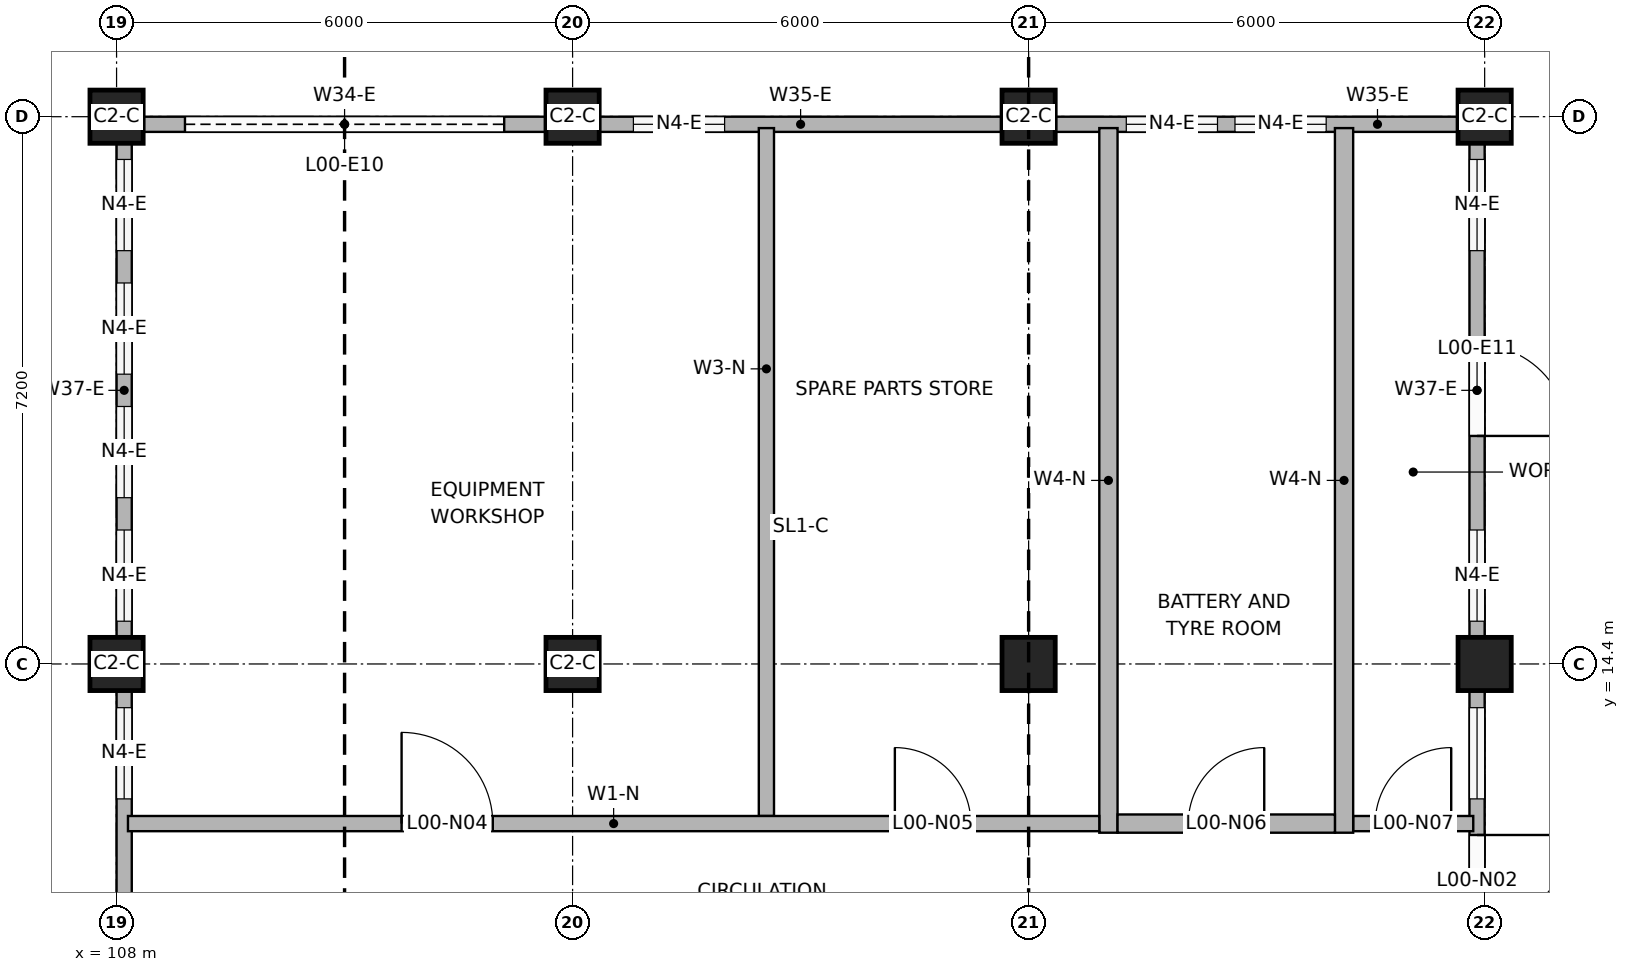
"""IFC4 building model, lengths in metres.
Left out: names, types, materials, properties, quantities, classifications, styles, units other than length and angle.
Written with IfcOpenShell. Run it as: python <this file> out.ifc"""

import sys

from ifc_helpers import new_model, si_unit, direction, frame, frame_2d, origin, origin_2d, place, context, subcontext, project, spatial, rectangle, extrude, element, fill, save


model = new_model("IFC4")
c1 = context("Model", 3, precision=1e-05, world=origin(), true_north=direction((0.0, 1.0)))
c2 = subcontext(c1, "Body", "Model", "MODEL_VIEW")
j1 = project(units=[si_unit("LENGTHUNIT", "METRE"), si_unit("PLANEANGLEUNIT", "RADIAN")], contexts=[c1])
p1 = place(None, origin())
s1 = spatial("IfcSite", under=j1, at=p1, CompositionType="ELEMENT")
p2 = place(p1, origin())
s2 = spatial("IfcBuilding", under=s1, at=p2, CompositionType="ELEMENT")
p3 = place(p2, origin())
s3 = spatial("IfcBuildingStorey", under=s2, at=p3, CompositionType="ELEMENT", Elevation=0.0)
for number, where, z_axis, x_axis in (
    (1, (108.0, 14.4, 0.0), (0.0, 0.0, 1.0), (1.0, 0.0, 0.0)),
    (2, (114.0, 14.4, 0.0), (0.0, 0.0, 1.0), (1.0, 0.0, 0.0)),
    (3, (120.0, 14.4, 0.0), (0.0, 0.0, 1.0), (1.0, 0.0, 0.0)),
    (4, (126.0, 14.4, 0.0), (0.0, 0.0, 1.0), (1.0, 0.0, 0.0)),
    (5, (108.0, 21.6, 0.0), (0.0, 0.0, 1.0), (1.0, 0.0, 0.0)),
    (6, (114.0, 21.6, 0.0), (0.0, 0.0, 1.0), (1.0, 0.0, 0.0)),
    (7, (120.0, 21.6, 0.0), (0.0, 0.0, 1.0), (1.0, 0.0, 0.0)),
    (8, (126.0, 21.6, 0.0), (0.0, 0.0, 1.0), (1.0, 0.0, 0.0)),
):
    element("IfcColumn", number, at=place(p3, frame(where, z_axis=z_axis, x_axis=x_axis)), inside=s3, PredefinedType="COLUMN", context=c2, shape_type="SweptSolid", body=[
        extrude(rectangle(XDim=0.7, YDim=0.7, at=origin_2d()), origin(), (0.0, 0.0, 1.0), 4.0),
    ])
p4 = place(p3, frame((108.35, 21.5, 0.0), z_axis=(0.0, 0.0, 1.0), x_axis=(1.0, 0.0, 0.0)))
e9 = element("IfcWall", 9, at=p4, inside=s3, PredefinedType="SOLIDWALL", context=c2, shape_type="SweptSolid", body=[
    extrude(rectangle(XDim=5.3, YDim=0.2, at=frame_2d((2.65, 0.0))), origin(), (0.0, 0.0, 1.0), 3.6),
])
p5 = place(p4, frame((0.55, 0.0, 0.0)))
e10 = element("IfcOpeningElement", 10, at=p5, cuts=e9, PredefinedType="OPENING", context=c2, shape_type="SweptSolid", body=[
    extrude(rectangle(XDim=4.2, YDim=3.5, at=frame_2d((2.1, 1.75))), frame((0.0, 0.11, 0.0), z_axis=(0.0, -1.0, 0.0), x_axis=(1.0, 0.0, 0.0)), (0.0, 0.0, 1.0), 0.22),
])
p6 = place(p3, frame((114.35, 21.5, 0.0), z_axis=(0.0, 0.0, 1.0), x_axis=(1.0, 0.0, 0.0)))
e11 = element("IfcWall", 11, at=p6, inside=s3, PredefinedType="SOLIDWALL", context=c2, shape_type="SweptSolid", body=[
    extrude(rectangle(XDim=5.3, YDim=0.2, at=frame_2d((2.65, 0.0))), origin(), (0.0, 0.0, 1.0), 3.2),
])
p7 = place(p6, frame((0.45, 0.0, 1.2)))
e12 = element("IfcOpeningElement", 12, at=p7, cuts=e11, PredefinedType="OPENING", context=c2, shape_type="SweptSolid", body=[
    extrude(rectangle(XDim=1.2, YDim=1.4, at=frame_2d((0.6, 0.7))), frame((0.0, 0.11, 0.0), z_axis=(0.0, -1.0, 0.0), x_axis=(1.0, 0.0, 0.0)), (0.0, 0.0, 1.0), 0.22),
])
p8 = place(p3, frame((120.35, 21.5, 0.0), z_axis=(0.0, 0.0, 1.0), x_axis=(1.0, 0.0, 0.0)))
e13 = element("IfcWall", 13, at=p8, inside=s3, PredefinedType="SOLIDWALL", context=c2, shape_type="SweptSolid", body=[
    extrude(rectangle(XDim=5.3, YDim=0.2, at=frame_2d((2.65, 0.0))), origin(), (0.0, 0.0, 1.0), 3.2),
])
p9 = place(p8, frame((0.935, 0.0, 1.2)))
e14 = element("IfcOpeningElement", 14, at=p9, cuts=e13, PredefinedType="OPENING", context=c2, shape_type="SweptSolid", body=[
    extrude(rectangle(XDim=1.2, YDim=1.4, at=frame_2d((0.6, 0.7))), frame((0.0, 0.11, 0.0), z_axis=(0.0, -1.0, 0.0), x_axis=(1.0, 0.0, 0.0)), (0.0, 0.0, 1.0), 0.22),
])
p10 = place(p8, frame((2.365, 0.0, 1.2)))
e15 = element("IfcOpeningElement", 15, at=p10, cuts=e13, PredefinedType="OPENING", context=c2, shape_type="SweptSolid", body=[
    extrude(rectangle(XDim=1.2, YDim=1.4, at=frame_2d((0.6, 0.7))), frame((0.0, 0.11, 0.0), z_axis=(0.0, -1.0, 0.0), x_axis=(1.0, 0.0, 0.0)), (0.0, 0.0, 1.0), 0.22),
])
p11 = place(p3, frame((125.9, 7.55, 0.0), z_axis=(0.0, 0.0, 1.0), x_axis=(0.0, 1.0, 0.0)))
e16 = element("IfcWall", 16, at=p11, inside=s3, PredefinedType="SOLIDWALL", context=c2, shape_type="SweptSolid", body=[
    extrude(rectangle(XDim=6.5, YDim=0.2, at=frame_2d((3.25, 0.0))), origin(), (0.0, 0.0, 1.0), 3.1),
])
p12 = place(p11, frame((5.075, 0.0, 1.2)))
e17 = element("IfcOpeningElement", 17, at=p12, cuts=e16, PredefinedType="OPENING", context=c2, shape_type="SweptSolid", body=[
    extrude(rectangle(XDim=1.2, YDim=1.4, at=frame_2d((0.6, 0.7))), frame((0.0, 0.11, 0.0), z_axis=(0.0, -1.0, 0.0), x_axis=(1.0, 0.0, 0.0)), (0.0, 0.0, 1.0), 0.22),
])
p13 = place(p11, frame((3.4, 0.0, 0.0)))
e18 = element("IfcOpeningElement", 18, at=p13, cuts=e16, PredefinedType="OPENING", context=c2, shape_type="SweptSolid", body=[
    extrude(rectangle(XDim=1.2, YDim=2.1, at=frame_2d((0.6, 1.05))), frame((0.0, 0.11, 0.0), z_axis=(0.0, -1.0, 0.0), x_axis=(1.0, 0.0, 0.0)), (0.0, 0.0, 1.0), 0.22),
])
p14 = place(p3, frame((125.9, 14.75, 0.0), z_axis=(0.0, 0.0, 1.0), x_axis=(0.0, 1.0, 0.0)))
e19 = element("IfcWall", 19, at=p14, inside=s3, PredefinedType="SOLIDWALL", context=c2, shape_type="SweptSolid", body=[
    extrude(rectangle(XDim=6.5, YDim=0.2, at=frame_2d((3.25, 0.0))), origin(), (0.0, 0.0, 1.0), 3.1),
])
p15 = place(p14, frame((2.65, 0.0, 0.0)))
e20 = element("IfcOpeningElement", 20, at=p15, cuts=e19, PredefinedType="OPENING", context=c2, shape_type="SweptSolid", body=[
    extrude(rectangle(XDim=1.2, YDim=2.4, at=frame_2d((0.6, 1.2))), frame((0.0, 0.11, 0.0), z_axis=(0.0, -1.0, 0.0), x_axis=(1.0, 0.0, 0.0)), (0.0, 0.0, 1.0), 0.22),
])
p16 = place(p14, frame((0.212, 0.0, 1.2)))
e21 = element("IfcOpeningElement", 21, at=p16, cuts=e19, PredefinedType="OPENING", context=c2, shape_type="SweptSolid", body=[
    extrude(rectangle(XDim=1.2, YDim=1.4, at=frame_2d((0.6, 0.7))), frame((0.0, 0.11, 0.0), z_axis=(0.0, -1.0, 0.0), x_axis=(1.0, 0.0, 0.0)), (0.0, 0.0, 1.0), 0.22),
])
p17 = place(p14, frame((5.087, 0.0, 1.2)))
e22 = element("IfcOpeningElement", 22, at=p17, cuts=e19, PredefinedType="OPENING", context=c2, shape_type="SweptSolid", body=[
    extrude(rectangle(XDim=1.2, YDim=1.4, at=frame_2d((0.6, 0.7))), frame((0.0, 0.11, 0.0), z_axis=(0.0, -1.0, 0.0), x_axis=(1.0, 0.0, 0.0)), (0.0, 0.0, 1.0), 0.22),
])
p18 = place(p3, frame((108.1, 7.55, 0.0), z_axis=(0.0, 0.0, 1.0), x_axis=(0.0, 1.0, 0.0)))
e23 = element("IfcWall", 23, at=p18, inside=s3, PredefinedType="SOLIDWALL", context=c2, shape_type="SweptSolid", body=[
    extrude(rectangle(XDim=6.5, YDim=0.2, at=frame_2d((3.25, 0.0))), origin(), (0.0, 0.0, 1.0), 3.1),
])
p19 = place(p18, frame((5.075, 0.0, 1.2)))
e24 = element("IfcOpeningElement", 24, at=p19, cuts=e23, PredefinedType="OPENING", context=c2, shape_type="SweptSolid", body=[
    extrude(rectangle(XDim=1.2, YDim=1.4, at=frame_2d((0.6, 0.7))), frame((0.0, 0.11, 0.0), z_axis=(0.0, -1.0, 0.0), x_axis=(1.0, 0.0, 0.0)), (0.0, 0.0, 1.0), 0.22),
])
p20 = place(p3, frame((108.1, 14.75, 0.0), z_axis=(0.0, 0.0, 1.0), x_axis=(0.0, 1.0, 0.0)))
e25 = element("IfcWall", 25, at=p20, inside=s3, PredefinedType="SOLIDWALL", context=c2, shape_type="SweptSolid", body=[
    extrude(rectangle(XDim=6.5, YDim=0.2, at=frame_2d((3.25, 0.0))), origin(), (0.0, 0.0, 1.0), 3.1),
])
p21 = place(p20, frame((0.212, 0.0, 1.2)))
e26 = element("IfcOpeningElement", 26, at=p21, cuts=e25, PredefinedType="OPENING", context=c2, shape_type="SweptSolid", body=[
    extrude(rectangle(XDim=1.2, YDim=1.4, at=frame_2d((0.6, 0.7))), frame((0.0, 0.11, 0.0), z_axis=(0.0, -1.0, 0.0), x_axis=(1.0, 0.0, 0.0)), (0.0, 0.0, 1.0), 0.22),
])
p22 = place(p20, frame((1.837, 0.0, 1.2)))
e27 = element("IfcOpeningElement", 27, at=p22, cuts=e25, PredefinedType="OPENING", context=c2, shape_type="SweptSolid", body=[
    extrude(rectangle(XDim=1.2, YDim=1.4, at=frame_2d((0.6, 0.7))), frame((0.0, 0.11, 0.0), z_axis=(0.0, -1.0, 0.0), x_axis=(1.0, 0.0, 0.0)), (0.0, 0.0, 1.0), 0.22),
])
p23 = place(p20, frame((3.462, 0.0, 1.2)))
e28 = element("IfcOpeningElement", 28, at=p23, cuts=e25, PredefinedType="OPENING", context=c2, shape_type="SweptSolid", body=[
    extrude(rectangle(XDim=1.2, YDim=1.4, at=frame_2d((0.6, 0.7))), frame((0.0, 0.11, 0.0), z_axis=(0.0, -1.0, 0.0), x_axis=(1.0, 0.0, 0.0)), (0.0, 0.0, 1.0), 0.22),
])
p24 = place(p20, frame((5.087, 0.0, 1.2)))
e29 = element("IfcOpeningElement", 29, at=p24, cuts=e25, PredefinedType="OPENING", context=c2, shape_type="SweptSolid", body=[
    extrude(rectangle(XDim=1.2, YDim=1.4, at=frame_2d((0.6, 0.7))), frame((0.0, 0.11, 0.0), z_axis=(0.0, -1.0, 0.0), x_axis=(1.0, 0.0, 0.0)), (0.0, 0.0, 1.0), 0.22),
])
p25 = place(p3, frame((116.55, 12.4, 0.0), z_axis=(0.0, 0.0, 1.0), x_axis=(0.0, 1.0, 0.0)))
e30 = element("IfcWall", 30, at=p25, inside=s3, PredefinedType="PARTITIONING", context=c2, shape_type="SweptSolid", body=[
    extrude(rectangle(XDim=9.05, YDim=0.2, at=frame_2d((4.525, 0.0))), origin(), (0.0, 0.0, 1.0), 3.2),
])
for number, where, z_axis, x_axis in (
    (31, (121.05, 12.18, 0.0), (0.0, 0.0, 1.0), (0.0, 1.0, 0.0)),
    (32, (124.15, 12.18, 0.0), (0.0, 0.0, 1.0), (0.0, 1.0, 0.0)),
):
    element("IfcWall", number, at=place(p3, frame(where, z_axis=z_axis, x_axis=x_axis)), inside=s3, PredefinedType="PARTITIONING", context=c2, shape_type="SweptSolid", body=[
        extrude(rectangle(XDim=9.27, YDim=0.24, at=frame_2d((4.635, 0.0))), origin(), (0.0, 0.0, 1.0), 3.2),
    ])
p26 = place(p3, frame((108.15, 12.3, 0.0), z_axis=(0.0, 0.0, 1.0), x_axis=(1.0, 0.0, 0.0)))
e33 = element("IfcWall", 33, at=p26, inside=s3, PredefinedType="PARTITIONING", context=c2, shape_type="SweptSolid", body=[
    extrude(rectangle(XDim=12.78, YDim=0.2, at=frame_2d((6.39, 0.0))), origin(), (0.0, 0.0, 1.0), 3.1),
])
p27 = place(p26, frame((3.6, 0.0, 0.0)))
e34 = element("IfcOpeningElement", 34, at=p27, cuts=e33, PredefinedType="OPENING", context=c2, shape_type="SweptSolid", body=[
    extrude(rectangle(XDim=1.2, YDim=2.1, at=frame_2d((0.6, 1.05))), frame((0.0, 0.11, 0.0), z_axis=(0.0, -1.0, 0.0), x_axis=(1.0, 0.0, 0.0)), (0.0, 0.0, 1.0), 0.22),
])
p28 = place(p26, frame((10.09, 0.0, 0.0)))
e35 = element("IfcOpeningElement", 35, at=p28, cuts=e33, PredefinedType="OPENING", context=c2, shape_type="SweptSolid", body=[
    extrude(rectangle(XDim=1.0, YDim=2.1, at=frame_2d((0.5, 1.05))), frame((0.0, 0.11, 0.0), z_axis=(0.0, -1.0, 0.0), x_axis=(1.0, 0.0, 0.0)), (0.0, 0.0, 1.0), 0.22),
])
p29 = place(p3, frame((121.17, 12.3, 0.0), z_axis=(0.0, 0.0, 1.0), x_axis=(1.0, 0.0, 0.0)))
e36 = element("IfcWall", 36, at=p29, inside=s3, PredefinedType="PARTITIONING", context=c2, shape_type="SweptSolid", body=[
    extrude(rectangle(XDim=2.86, YDim=0.24, at=frame_2d((1.43, 0.0))), origin(), (0.0, 0.0, 1.0), 4.0),
])
p30 = place(p29, frame((0.93, 0.0, 0.0)))
e37 = element("IfcOpeningElement", 37, at=p30, cuts=e36, PredefinedType="OPENING", context=c2, shape_type="SweptSolid", body=[
    extrude(rectangle(XDim=1.0, YDim=2.1, at=frame_2d((0.5, 1.05))), frame((0.0, 0.13, 0.0), z_axis=(0.0, -1.0, 0.0), x_axis=(1.0, 0.0, 0.0)), (0.0, 0.0, 1.0), 0.26),
])
p31 = place(p3, frame((124.27, 12.3, 0.0), z_axis=(0.0, 0.0, 1.0), x_axis=(1.0, 0.0, 0.0)))
e38 = element("IfcWall", 38, at=p31, inside=s3, PredefinedType="PARTITIONING", context=c2, shape_type="SweptSolid", body=[
    extrude(rectangle(XDim=1.58, YDim=0.2, at=frame_2d((0.79, 0.0))), origin(), (0.0, 0.0, 1.0), 3.1),
])
p32 = place(p31, frame((0.29, 0.0, 0.0)))
e39 = element("IfcOpeningElement", 39, at=p32, cuts=e38, PredefinedType="OPENING", context=c2, shape_type="SweptSolid", body=[
    extrude(rectangle(XDim=1.0, YDim=2.1, at=frame_2d((0.5, 1.05))), frame((0.0, 0.11, 0.0), z_axis=(0.0, -1.0, 0.0), x_axis=(1.0, 0.0, 0.0)), (0.0, 0.0, 1.0), 0.22),
])
p33 = place(p5, origin())
e40 = element("IfcDoor", 40, at=p33, inside=s3, OperationType="ROLLINGUP", PredefinedType="DOOR", context=c2, shape_type="SweptSolid", body=[
    extrude(rectangle(XDim=4.2, YDim=3.5, at=frame_2d((2.1, 1.75))), frame((0.0, 0.025, 0.0), z_axis=(0.0, -1.0, 0.0), x_axis=(1.0, 0.0, 0.0)), (0.0, 0.0, 1.0), 0.05),
])
fill(e10, e40)
p34 = place(p7, origin())
e41 = element("IfcWindow", 41, at=p34, inside=s3, PartitioningType="SINGLE_PANEL", PredefinedType="WINDOW", context=c2, shape_type="SweptSolid", body=[
    extrude(rectangle(XDim=1.2, YDim=1.4, at=frame_2d((0.6, 0.7))), frame((0.0, 0.03, 0.0), z_axis=(0.0, -1.0, 0.0), x_axis=(1.0, 0.0, 0.0)), (0.0, 0.0, 1.0), 0.06),
])
fill(e12, e41)
p35 = place(p9, origin())
e42 = element("IfcWindow", 42, at=p35, inside=s3, PartitioningType="SINGLE_PANEL", PredefinedType="WINDOW", context=c2, shape_type="SweptSolid", body=[
    extrude(rectangle(XDim=1.2, YDim=1.4, at=frame_2d((0.6, 0.7))), frame((0.0, 0.03, 0.0), z_axis=(0.0, -1.0, 0.0), x_axis=(1.0, 0.0, 0.0)), (0.0, 0.0, 1.0), 0.06),
])
fill(e14, e42)
p36 = place(p10, origin())
e43 = element("IfcWindow", 43, at=p36, inside=s3, PartitioningType="SINGLE_PANEL", PredefinedType="WINDOW", context=c2, shape_type="SweptSolid", body=[
    extrude(rectangle(XDim=1.2, YDim=1.4, at=frame_2d((0.6, 0.7))), frame((0.0, 0.03, 0.0), z_axis=(0.0, -1.0, 0.0), x_axis=(1.0, 0.0, 0.0)), (0.0, 0.0, 1.0), 0.06),
])
fill(e15, e43)
p37 = place(p12, origin())
e44 = element("IfcWindow", 44, at=p37, inside=s3, PartitioningType="SINGLE_PANEL", PredefinedType="WINDOW", context=c2, shape_type="SweptSolid", body=[
    extrude(rectangle(XDim=1.2, YDim=1.4, at=frame_2d((0.6, 0.7))), frame((0.0, 0.03, 0.0), z_axis=(0.0, -1.0, 0.0), x_axis=(1.0, 0.0, 0.0)), (0.0, 0.0, 1.0), 0.06),
])
fill(e17, e44)
p38 = place(p15, frame((1.2, 0.0, 0.0), z_axis=(0.0, 0.0, 1.0), x_axis=(-1.0, 0.0, 0.0)))
e45 = element("IfcDoor", 45, at=p38, inside=s3, OperationType="SINGLE_SWING_RIGHT", PredefinedType="DOOR", context=c2, shape_type="SweptSolid", body=[
    extrude(rectangle(XDim=1.2, YDim=2.4, at=frame_2d((0.6, 1.2))), frame((0.0, 0.025, 0.0), z_axis=(0.0, -1.0, 0.0), x_axis=(1.0, 0.0, 0.0)), (0.0, 0.0, 1.0), 0.05),
])
fill(e20, e45)
p39 = place(p16, origin())
e46 = element("IfcWindow", 46, at=p39, inside=s3, PartitioningType="SINGLE_PANEL", PredefinedType="WINDOW", context=c2, shape_type="SweptSolid", body=[
    extrude(rectangle(XDim=1.2, YDim=1.4, at=frame_2d((0.6, 0.7))), frame((0.0, 0.03, 0.0), z_axis=(0.0, -1.0, 0.0), x_axis=(1.0, 0.0, 0.0)), (0.0, 0.0, 1.0), 0.06),
])
fill(e21, e46)
p40 = place(p17, origin())
e47 = element("IfcWindow", 47, at=p40, inside=s3, PartitioningType="SINGLE_PANEL", PredefinedType="WINDOW", context=c2, shape_type="SweptSolid", body=[
    extrude(rectangle(XDim=1.2, YDim=1.4, at=frame_2d((0.6, 0.7))), frame((0.0, 0.03, 0.0), z_axis=(0.0, -1.0, 0.0), x_axis=(1.0, 0.0, 0.0)), (0.0, 0.0, 1.0), 0.06),
])
fill(e22, e47)
p41 = place(p19, origin())
e48 = element("IfcWindow", 48, at=p41, inside=s3, PartitioningType="SINGLE_PANEL", PredefinedType="WINDOW", context=c2, shape_type="SweptSolid", body=[
    extrude(rectangle(XDim=1.2, YDim=1.4, at=frame_2d((0.6, 0.7))), frame((0.0, 0.03, 0.0), z_axis=(0.0, -1.0, 0.0), x_axis=(1.0, 0.0, 0.0)), (0.0, 0.0, 1.0), 0.06),
])
fill(e24, e48)
p42 = place(p21, origin())
e49 = element("IfcWindow", 49, at=p42, inside=s3, PartitioningType="SINGLE_PANEL", PredefinedType="WINDOW", context=c2, shape_type="SweptSolid", body=[
    extrude(rectangle(XDim=1.2, YDim=1.4, at=frame_2d((0.6, 0.7))), frame((0.0, 0.03, 0.0), z_axis=(0.0, -1.0, 0.0), x_axis=(1.0, 0.0, 0.0)), (0.0, 0.0, 1.0), 0.06),
])
fill(e26, e49)
p43 = place(p22, origin())
e50 = element("IfcWindow", 50, at=p43, inside=s3, PartitioningType="SINGLE_PANEL", PredefinedType="WINDOW", context=c2, shape_type="SweptSolid", body=[
    extrude(rectangle(XDim=1.2, YDim=1.4, at=frame_2d((0.6, 0.7))), frame((0.0, 0.03, 0.0), z_axis=(0.0, -1.0, 0.0), x_axis=(1.0, 0.0, 0.0)), (0.0, 0.0, 1.0), 0.06),
])
fill(e27, e50)
p44 = place(p23, origin())
e51 = element("IfcWindow", 51, at=p44, inside=s3, PartitioningType="SINGLE_PANEL", PredefinedType="WINDOW", context=c2, shape_type="SweptSolid", body=[
    extrude(rectangle(XDim=1.2, YDim=1.4, at=frame_2d((0.6, 0.7))), frame((0.0, 0.03, 0.0), z_axis=(0.0, -1.0, 0.0), x_axis=(1.0, 0.0, 0.0)), (0.0, 0.0, 1.0), 0.06),
])
fill(e28, e51)
p45 = place(p24, origin())
e52 = element("IfcWindow", 52, at=p45, inside=s3, PartitioningType="SINGLE_PANEL", PredefinedType="WINDOW", context=c2, shape_type="SweptSolid", body=[
    extrude(rectangle(XDim=1.2, YDim=1.4, at=frame_2d((0.6, 0.7))), frame((0.0, 0.03, 0.0), z_axis=(0.0, -1.0, 0.0), x_axis=(1.0, 0.0, 0.0)), (0.0, 0.0, 1.0), 0.06),
])
fill(e29, e52)
p46 = place(p13, frame((1.2, 0.0, 0.0), z_axis=(0.0, 0.0, 1.0), x_axis=(-1.0, 0.0, 0.0)))
e53 = element("IfcDoor", 53, at=p46, inside=s3, OperationType="SINGLE_SWING_LEFT", PredefinedType="DOOR", context=c2, shape_type="SweptSolid", body=[
    extrude(rectangle(XDim=1.2, YDim=2.1, at=frame_2d((0.6, 1.05))), frame((0.0, 0.025, 0.0), z_axis=(0.0, -1.0, 0.0), x_axis=(1.0, 0.0, 0.0)), (0.0, 0.0, 1.0), 0.05),
])
fill(e18, e53)
p47 = place(p27, origin())
e54 = element("IfcDoor", 54, at=p47, inside=s3, OperationType="SINGLE_SWING_LEFT", PredefinedType="DOOR", context=c2, shape_type="SweptSolid", body=[
    extrude(rectangle(XDim=1.2, YDim=2.1, at=frame_2d((0.6, 1.05))), frame((0.0, 0.025, 0.0), z_axis=(0.0, -1.0, 0.0), x_axis=(1.0, 0.0, 0.0)), (0.0, 0.0, 1.0), 0.05),
])
fill(e34, e54)
p48 = place(p28, origin())
e55 = element("IfcDoor", 55, at=p48, inside=s3, OperationType="SINGLE_SWING_LEFT", PredefinedType="DOOR", context=c2, shape_type="SweptSolid", body=[
    extrude(rectangle(XDim=1.0, YDim=2.1, at=frame_2d((0.5, 1.05))), frame((0.0, 0.025, 0.0), z_axis=(0.0, -1.0, 0.0), x_axis=(1.0, 0.0, 0.0)), (0.0, 0.0, 1.0), 0.05),
])
fill(e35, e55)
p49 = place(p30, origin())
e56 = element("IfcDoor", 56, at=p49, inside=s3, OperationType="SINGLE_SWING_RIGHT", PredefinedType="DOOR", context=c2, shape_type="SweptSolid", body=[
    extrude(rectangle(XDim=1.0, YDim=2.1, at=frame_2d((0.5, 1.05))), frame((0.0, 0.025, 0.0), z_axis=(0.0, -1.0, 0.0), x_axis=(1.0, 0.0, 0.0)), (0.0, 0.0, 1.0), 0.05),
])
fill(e37, e56)
p50 = place(p32, origin())
e57 = element("IfcDoor", 57, at=p50, inside=s3, OperationType="SINGLE_SWING_RIGHT", PredefinedType="DOOR", context=c2, shape_type="SweptSolid", body=[
    extrude(rectangle(XDim=1.0, YDim=2.1, at=frame_2d((0.5, 1.05))), frame((0.0, 0.025, 0.0), z_axis=(0.0, -1.0, 0.0), x_axis=(1.0, 0.0, 0.0)), (0.0, 0.0, 1.0), 0.05),
])
fill(e39, e57)
save(model, sys.argv[1])
